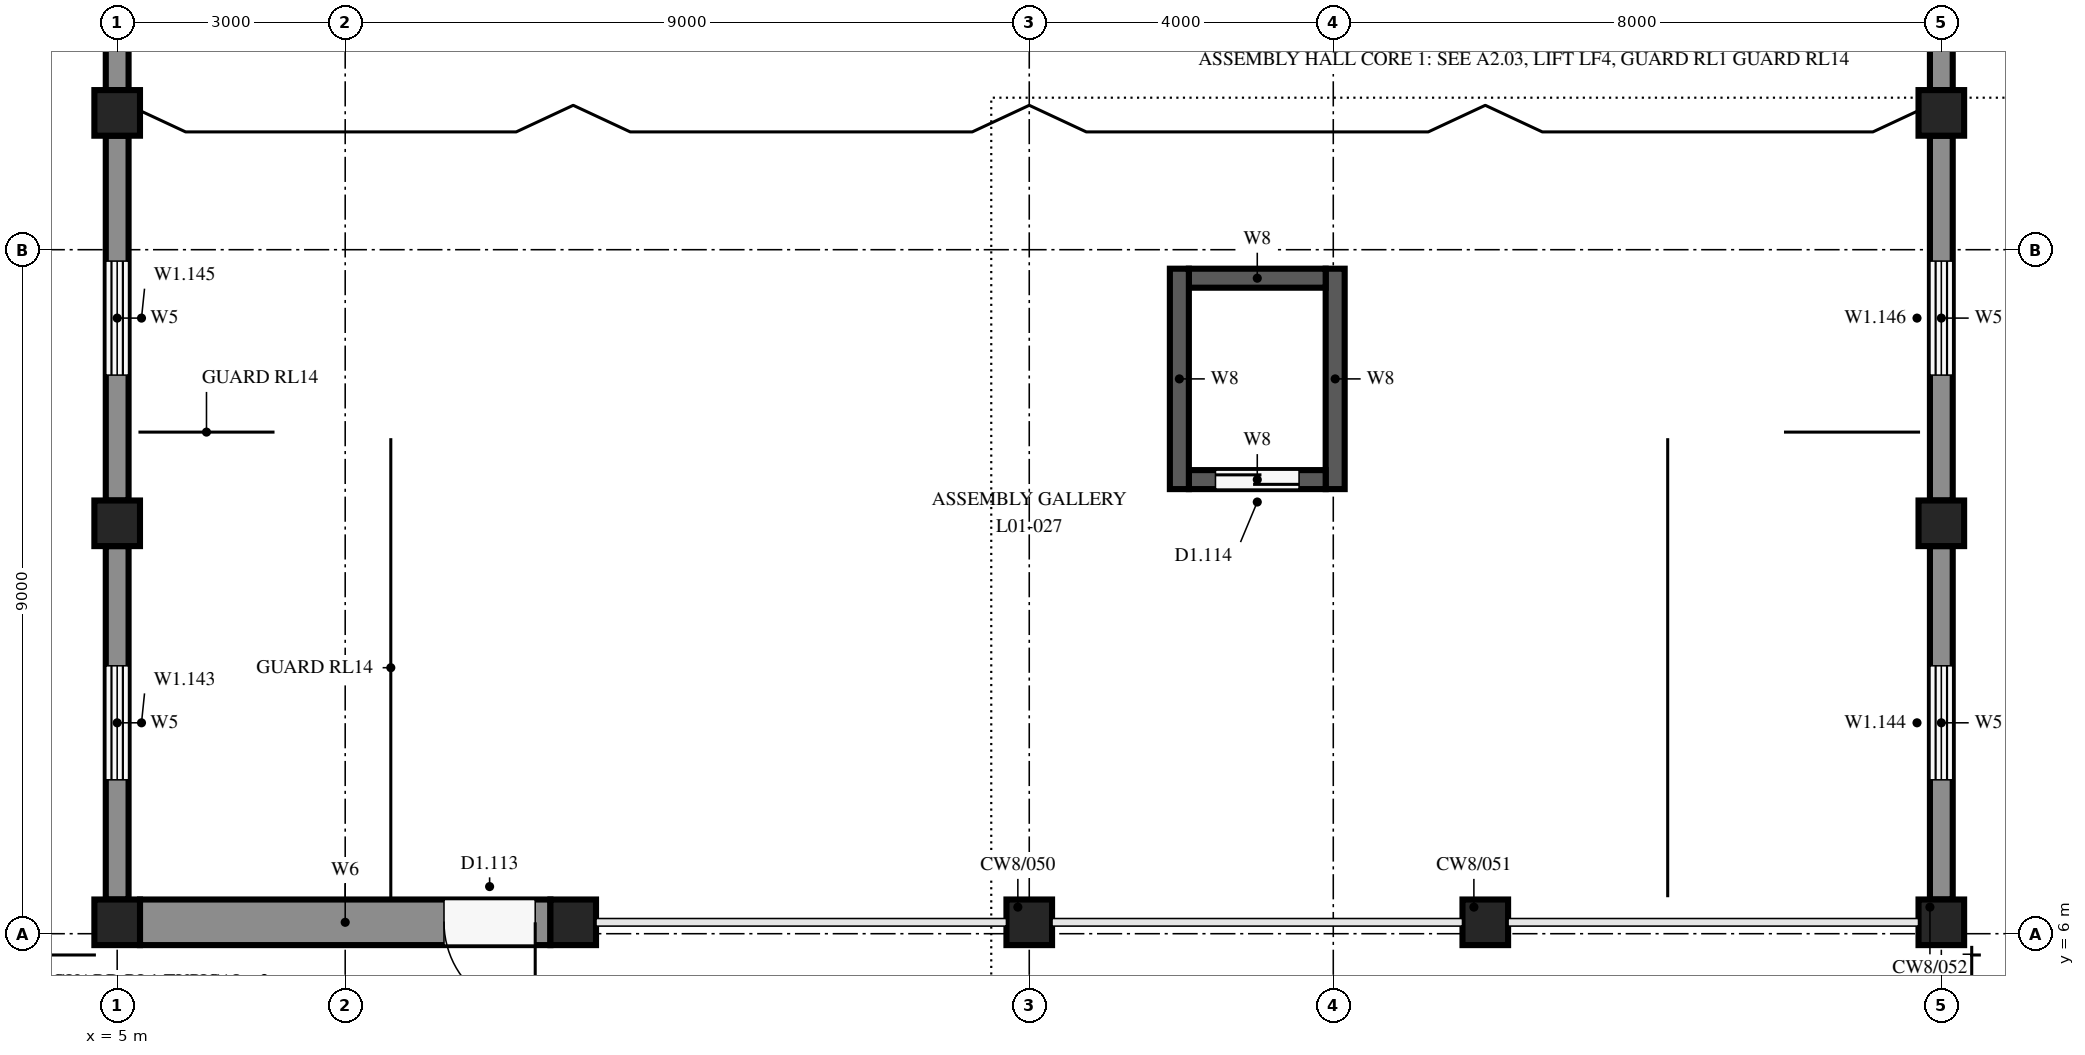
"""IFC4 building model, lengths in metres.
Left out: names, types, materials, properties, quantities, classifications, styles, units other than length and angle.
Written with IfcOpenShell. Run it as: python <this file> out.ifc"""

import sys

from ifc_helpers import new_model, si_unit, direction, frame, frame_2d, origin, origin_2d, place, context, subcontext, project, spatial, rectangle, extrude, element, fill, save


model = new_model("IFC4")
c1 = context("Model", 3, precision=1e-05, world=origin(), true_north=direction((0.0, 1.0)))
c2 = subcontext(c1, "Body", "Model", "MODEL_VIEW")
j1 = project(units=[si_unit("LENGTHUNIT", "METRE"), si_unit("PLANEANGLEUNIT", "RADIAN")], contexts=[c1])
p1 = place(None, origin())
s1 = spatial("IfcSite", under=j1, at=p1, CompositionType="ELEMENT")
p2 = place(p1, origin())
s2 = spatial("IfcBuilding", under=s1, at=p2, CompositionType="ELEMENT")
p3 = place(p2, frame((0.0, 0.0, 4.5)))
s3 = spatial("IfcBuildingStorey", under=s2, at=p3, CompositionType="ELEMENT", Elevation=4.5)
for number, where, z_axis, x_axis in (
    (1, (5.0, 6.15, 0.0), (0.0, 0.0, 1.0), (1.0, 0.0, 0.0)),
    (2, (5.0, 11.4, 0.0), (0.0, 0.0, 1.0), (1.0, 0.0, 0.0)),
    (3, (5.0, 16.8, 0.0), (0.0, 0.0, 1.0), (1.0, 0.0, 0.0)),
    (4, (11.0, 6.15, 0.0), (0.0, 0.0, 1.0), (1.0, 0.0, 0.0)),
    (5, (17.0, 6.15, 0.0), (0.0, 0.0, 1.0), (1.0, 0.0, 0.0)),
    (6, (23.0, 6.15, 0.0), (0.0, 0.0, 1.0), (1.0, 0.0, 0.0)),
    (7, (29.0, 6.15, 0.0), (0.0, 0.0, 1.0), (1.0, 0.0, 0.0)),
    (8, (29.0, 11.4, 0.0), (0.0, 0.0, 1.0), (1.0, 0.0, 0.0)),
    (9, (29.0, 16.8, 0.0), (0.0, 0.0, 1.0), (1.0, 0.0, 0.0)),
):
    element("IfcColumn", number, at=place(p3, frame(where, z_axis=z_axis, x_axis=x_axis)), inside=s3, PredefinedType="COLUMN", context=c2, shape_type="SweptSolid", body=[
        extrude(rectangle(XDim=0.6, YDim=0.6, at=origin_2d()), origin(), (0.0, 0.0, 1.0), 3.6),
    ])
p4 = place(p3, frame((5.0, 6.45, 0.0), z_axis=(0.0, 0.0, 1.0), x_axis=(0.0, 1.0, 0.0)))
e10 = element("IfcWall", 10, at=p4, inside=s3, PredefinedType="SOLIDWALL", context=c2, shape_type="SweptSolid", body=[
    extrude(rectangle(XDim=4.65, YDim=0.3, at=frame_2d((2.325, 0.0))), origin(), (0.0, 0.0, 1.0), 3.6),
])
p5 = place(p4, frame((1.575, 0.0, 0.9)))
e11 = element("IfcOpeningElement", 11, at=p5, cuts=e10, PredefinedType="OPENING", context=c2, shape_type="SweptSolid", body=[
    extrude(rectangle(XDim=1.5, YDim=2.4, at=frame_2d((0.75, 1.2))), frame((0.0, 0.16, 0.0), z_axis=(0.0, -1.0, 0.0), x_axis=(1.0, 0.0, 0.0)), (0.0, 0.0, 1.0), 0.32),
])
p6 = place(p3, frame((5.0, 11.7, 0.0), z_axis=(0.0, 0.0, 1.0), x_axis=(0.0, 1.0, 0.0)))
e12 = element("IfcWall", 12, at=p6, inside=s3, PredefinedType="SOLIDWALL", context=c2, shape_type="SweptSolid", body=[
    extrude(rectangle(XDim=4.8, YDim=0.3, at=frame_2d((2.4, 0.0))), origin(), (0.0, 0.0, 1.0), 3.6),
])
p7 = place(p6, frame((1.65, 0.0, 0.9)))
e13 = element("IfcOpeningElement", 13, at=p7, cuts=e12, PredefinedType="OPENING", context=c2, shape_type="SweptSolid", body=[
    extrude(rectangle(XDim=1.5, YDim=2.4, at=frame_2d((0.75, 1.2))), frame((0.0, 0.16, 0.0), z_axis=(0.0, -1.0, 0.0), x_axis=(1.0, 0.0, 0.0)), (0.0, 0.0, 1.0), 0.32),
])
p8 = place(p3, frame((5.0, 17.1, 0.0), z_axis=(0.0, 0.0, 1.0), x_axis=(0.0, 1.0, 0.0)))
e14 = element("IfcWall", 14, at=p8, inside=s3, PredefinedType="SOLIDWALL", context=c2, shape_type="SweptSolid", body=[
    extrude(rectangle(XDim=4.8, YDim=0.3, at=frame_2d((2.4, 0.0))), origin(), (0.0, 0.0, 1.0), 3.6),
])
p9 = place(p8, frame((1.65, 0.0, 0.9)))
e15 = element("IfcOpeningElement", 15, at=p9, cuts=e14, PredefinedType="OPENING", context=c2, shape_type="SweptSolid", body=[
    extrude(rectangle(XDim=1.5, YDim=2.4, at=frame_2d((0.75, 1.2))), frame((0.0, 0.16, 0.0), z_axis=(0.0, -1.0, 0.0), x_axis=(1.0, 0.0, 0.0)), (0.0, 0.0, 1.0), 0.32),
])
p10 = place(p3, frame((29.0, 11.1, 0.0), z_axis=(0.0, 0.0, 1.0), x_axis=(0.0, -1.0, 0.0)))
e16 = element("IfcWall", 16, at=p10, inside=s3, PredefinedType="SOLIDWALL", context=c2, shape_type="SweptSolid", body=[
    extrude(rectangle(XDim=4.65, YDim=0.3, at=frame_2d((2.325, 0.0))), origin(), (0.0, 0.0, 1.0), 3.6),
])
p11 = place(p10, frame((1.575, 0.0, 0.9)))
e17 = element("IfcOpeningElement", 17, at=p11, cuts=e16, PredefinedType="OPENING", context=c2, shape_type="SweptSolid", body=[
    extrude(rectangle(XDim=1.5, YDim=2.4, at=frame_2d((0.75, 1.2))), frame((0.0, 0.16, 0.0), z_axis=(0.0, -1.0, 0.0), x_axis=(1.0, 0.0, 0.0)), (0.0, 0.0, 1.0), 0.32),
])
p12 = place(p3, frame((29.0, 16.5, 0.0), z_axis=(0.0, 0.0, 1.0), x_axis=(0.0, -1.0, 0.0)))
e18 = element("IfcWall", 18, at=p12, inside=s3, PredefinedType="SOLIDWALL", context=c2, shape_type="SweptSolid", body=[
    extrude(rectangle(XDim=4.8, YDim=0.3, at=frame_2d((2.4, 0.0))), origin(), (0.0, 0.0, 1.0), 3.6),
])
p13 = place(p12, frame((1.65, 0.0, 0.9)))
e19 = element("IfcOpeningElement", 19, at=p13, cuts=e18, PredefinedType="OPENING", context=c2, shape_type="SweptSolid", body=[
    extrude(rectangle(XDim=1.5, YDim=2.4, at=frame_2d((0.75, 1.2))), frame((0.0, 0.16, 0.0), z_axis=(0.0, -1.0, 0.0), x_axis=(1.0, 0.0, 0.0)), (0.0, 0.0, 1.0), 0.32),
])
p14 = place(p3, frame((29.0, 21.9, 0.0), z_axis=(0.0, 0.0, 1.0), x_axis=(0.0, -1.0, 0.0)))
e20 = element("IfcWall", 20, at=p14, inside=s3, PredefinedType="SOLIDWALL", context=c2, shape_type="SweptSolid", body=[
    extrude(rectangle(XDim=4.8, YDim=0.3, at=frame_2d((2.4, 0.0))), origin(), (0.0, 0.0, 1.0), 3.6),
])
p15 = place(p14, frame((1.65, 0.0, 0.9)))
e21 = element("IfcOpeningElement", 21, at=p15, cuts=e20, PredefinedType="OPENING", context=c2, shape_type="SweptSolid", body=[
    extrude(rectangle(XDim=1.5, YDim=2.4, at=frame_2d((0.75, 1.2))), frame((0.0, 0.16, 0.0), z_axis=(0.0, -1.0, 0.0), x_axis=(1.0, 0.0, 0.0)), (0.0, 0.0, 1.0), 0.32),
])
p16 = place(p3, frame((10.7, 6.15, 0.0), z_axis=(0.0, 0.0, 1.0), x_axis=(-1.0, 0.0, 0.0)))
e22 = element("IfcWall", 22, at=p16, inside=s3, PredefinedType="SOLIDWALL", context=c2, shape_type="SweptSolid", body=[
    extrude(rectangle(XDim=5.4, YDim=0.6, at=frame_2d((2.7, 0.0))), origin(), (0.0, 0.0, 1.0), 3.6),
])
p17 = place(p16, frame((0.2, 0.0, 0.0)))
e23 = element("IfcOpeningElement", 23, at=p17, cuts=e22, PredefinedType="OPENING", context=c2, shape_type="SweptSolid", body=[
    extrude(rectangle(XDim=1.2, YDim=2.4, at=frame_2d((0.6, 1.2))), frame((0.0, 0.31, 0.0), z_axis=(0.0, -1.0, 0.0), x_axis=(1.0, 0.0, 0.0)), (0.0, 0.0, 1.0), 0.62),
])
for number, where, z_axis, x_axis in (
    (24, (18.975, 11.85, 0.0), (0.0, 0.0, 1.0), (0.0, 1.0, 0.0)),
    (25, (21.025, 11.85, 0.0), (0.0, 0.0, 1.0), (0.0, 1.0, 0.0)),
):
    element("IfcWall", number, at=place(p3, frame(where, z_axis=z_axis, x_axis=x_axis)), inside=s3, PredefinedType="SHEAR", context=c2, shape_type="SweptSolid", body=[
        extrude(rectangle(XDim=2.9, YDim=0.25, at=frame_2d((1.45, 0.0))), origin(), (0.0, 0.0, 1.0), 2.8),
    ])
p18 = place(p3, frame((19.1, 11.975, 0.0), z_axis=(0.0, 0.0, 1.0), x_axis=(1.0, 0.0, 0.0)))
e26 = element("IfcWall", 26, at=p18, inside=s3, PredefinedType="SHEAR", context=c2, shape_type="SweptSolid", body=[
    extrude(rectangle(XDim=1.8, YDim=0.25, at=frame_2d((0.9, 0.0))), origin(), (0.0, 0.0, 1.0), 2.8),
])
p19 = place(p18, frame((0.35, 0.0, 0.0)))
e27 = element("IfcOpeningElement", 27, at=p19, cuts=e26, PredefinedType="OPENING", context=c2, shape_type="SweptSolid", body=[
    extrude(rectangle(XDim=1.1, YDim=2.1, at=frame_2d((0.55, 1.05))), frame((0.0, 0.135, 0.0), z_axis=(0.0, -1.0, 0.0), x_axis=(1.0, 0.0, 0.0)), (0.0, 0.0, 1.0), 0.27),
])
p20 = place(p3, frame((19.1, 14.625, 0.0), z_axis=(0.0, 0.0, 1.0), x_axis=(1.0, 0.0, 0.0)))
e28 = element("IfcWall", 28, at=p20, inside=s3, PredefinedType="SHEAR", context=c2, shape_type="SweptSolid", body=[
    extrude(rectangle(XDim=1.8, YDim=0.25, at=frame_2d((0.9, 0.0))), origin(), (0.0, 0.0, 1.0), 2.8),
])
p21 = place(p17, origin())
e29 = element("IfcDoor", 29, at=p21, inside=s3, OperationType="SINGLE_SWING_LEFT", PredefinedType="NOTDEFINED", context=c2, shape_type="SweptSolid", body=[
    extrude(rectangle(XDim=1.2, YDim=2.4, at=frame_2d((0.6, 1.2))), frame((0.0, 0.025, 0.0), z_axis=(0.0, -1.0, 0.0), x_axis=(1.0, 0.0, 0.0)), (0.0, 0.0, 1.0), 0.05),
])
fill(e23, e29)
p22 = place(p5, origin())
e30 = element("IfcWindow", 30, at=p22, inside=s3, PartitioningType="SINGLE_PANEL", PredefinedType="WINDOW", context=c2, shape_type="SweptSolid", body=[
    extrude(rectangle(XDim=1.5, YDim=2.4, at=frame_2d((0.75, 1.2))), frame((0.0, 0.03, 0.0), z_axis=(0.0, -1.0, 0.0), x_axis=(1.0, 0.0, 0.0)), (0.0, 0.0, 1.0), 0.06),
])
fill(e11, e30)
p23 = place(p7, origin())
e31 = element("IfcWindow", 31, at=p23, inside=s3, PartitioningType="SINGLE_PANEL", PredefinedType="WINDOW", context=c2, shape_type="SweptSolid", body=[
    extrude(rectangle(XDim=1.5, YDim=2.4, at=frame_2d((0.75, 1.2))), frame((0.0, 0.03, 0.0), z_axis=(0.0, -1.0, 0.0), x_axis=(1.0, 0.0, 0.0)), (0.0, 0.0, 1.0), 0.06),
])
fill(e13, e31)
p24 = place(p11, origin())
e32 = element("IfcWindow", 32, at=p24, inside=s3, PartitioningType="SINGLE_PANEL", PredefinedType="WINDOW", context=c2, shape_type="SweptSolid", body=[
    extrude(rectangle(XDim=1.5, YDim=2.4, at=frame_2d((0.75, 1.2))), frame((0.0, 0.03, 0.0), z_axis=(0.0, -1.0, 0.0), x_axis=(1.0, 0.0, 0.0)), (0.0, 0.0, 1.0), 0.06),
])
fill(e17, e32)
p25 = place(p13, origin())
e33 = element("IfcWindow", 33, at=p25, inside=s3, PartitioningType="SINGLE_PANEL", PredefinedType="WINDOW", context=c2, shape_type="SweptSolid", body=[
    extrude(rectangle(XDim=1.5, YDim=2.4, at=frame_2d((0.75, 1.2))), frame((0.0, 0.03, 0.0), z_axis=(0.0, -1.0, 0.0), x_axis=(1.0, 0.0, 0.0)), (0.0, 0.0, 1.0), 0.06),
])
fill(e19, e33)
p26 = place(p19, origin())
e34 = element("IfcDoor", 34, at=p26, inside=s3, OperationType="SLIDING_TO_LEFT", PredefinedType="NOTDEFINED", context=c2, shape_type="SweptSolid", body=[
    extrude(rectangle(XDim=1.1, YDim=2.1, at=frame_2d((0.55, 1.05))), frame((0.0, 0.025, 0.0), z_axis=(0.0, -1.0, 0.0), x_axis=(1.0, 0.0, 0.0)), (0.0, 0.0, 1.0), 0.05),
])
fill(e27, e34)
save(model, sys.argv[1])
